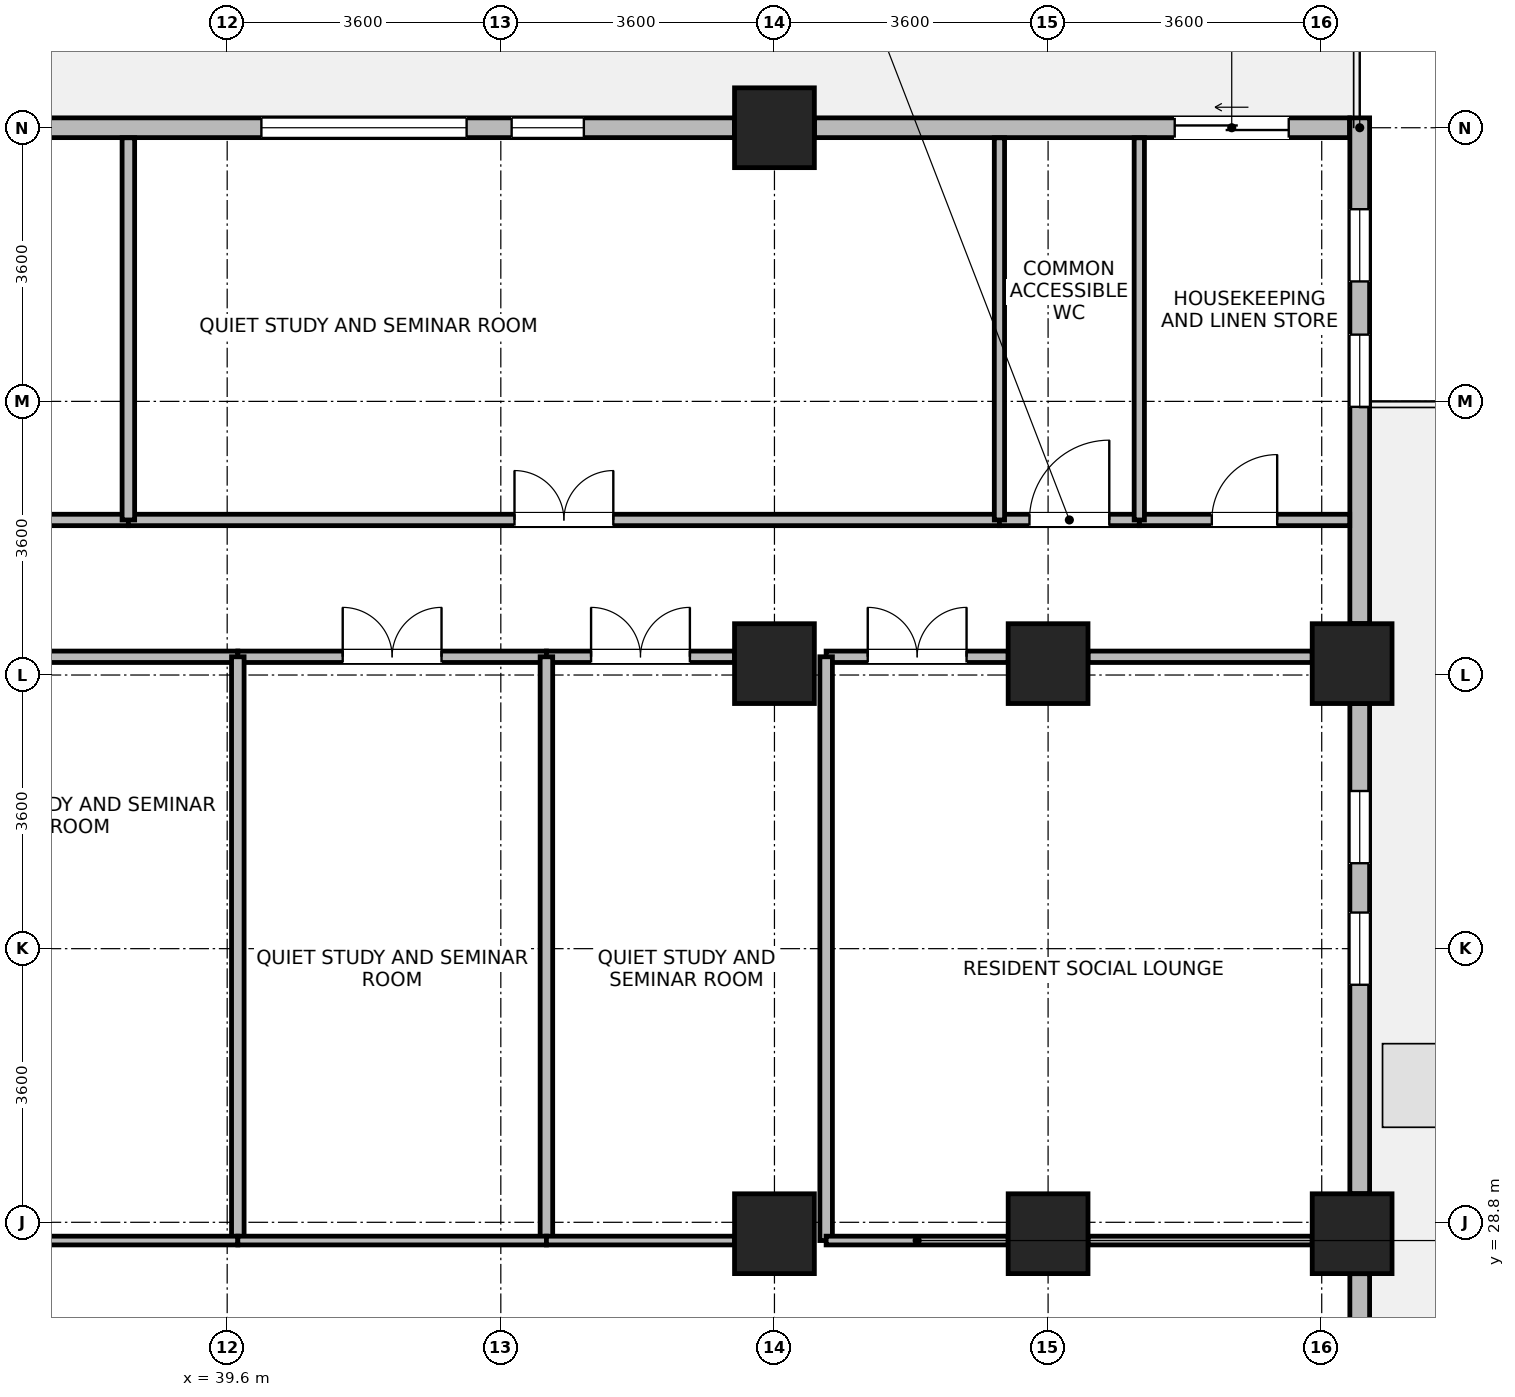
"""IFC4 building model, lengths in metres.
Left out: names, types, materials, properties, quantities, classifications, styles, units other than length and angle.
Written with IfcOpenShell. Run it as: python <this file> out.ifc"""

import sys

from ifc_helpers import new_model, si_unit, direction, frame, frame_2d, origin, origin_2d, place, context, subcontext, project, spatial, rectangle, extrude, source, transform, mapped, element, fill, save


model = new_model("IFC4")
c1 = context("Model", 3, precision=1e-05, world=origin(), true_north=direction((0.0, 1.0)))
c2 = subcontext(c1, "Body", "Model", "MODEL_VIEW")
j1 = project(units=[si_unit("LENGTHUNIT", "METRE"), si_unit("PLANEANGLEUNIT", "RADIAN")], contexts=[c1])
p1 = place(None, origin())
s1 = spatial("IfcSite", under=j1, at=p1, CompositionType="ELEMENT")
p2 = place(p1, origin())
s2 = spatial("IfcBuilding", under=s1, at=p2, CompositionType="ELEMENT")
p3 = place(p2, frame((0.0, 0.0, 135.6)))
s3 = spatial("IfcBuildingStorey", under=s2, at=p3, CompositionType="ELEMENT", Elevation=135.6)
m1 = source(origin(), c2, "Body", "SweptSolid", [
    extrude(rectangle(XDim=1.05, YDim=1.05, at=origin_2d()), origin(), (0.0, 0.0, 1.0), 4.6),
])
for number, where, z_axis, x_axis in (
    (1, (46.8, 28.65, 0.0), (0.0, 0.0, 1.0), (1.0, 0.0, 0.0)),
    (2, (46.8, 36.15, 0.0), (0.0, 0.0, 1.0), (1.0, 0.0, 0.0)),
    (3, (46.8, 43.2, 0.0), (0.0, 0.0, 1.0), (1.0, 0.0, 0.0)),
    (4, (50.4, 28.65, 0.0), (0.0, 0.0, 1.0), (1.0, 0.0, 0.0)),
    (5, (50.4, 36.15, 0.0), (0.0, 0.0, 1.0), (1.0, 0.0, 0.0)),
    (6, (54.4, 28.65, 0.0), (0.0, 0.0, 1.0), (1.0, 0.0, 0.0)),
    (7, (54.4, 36.15, 0.0), (0.0, 0.0, 1.0), (1.0, 0.0, 0.0)),
):
    element("IfcColumn", number, at=place(p3, frame(where, z_axis=z_axis, x_axis=x_axis)), inside=s3, PredefinedType="COLUMN", context=c2, shape_type="MappedRepresentation", body=[
        mapped(m1, transform((0.0, 0.0, 0.0), x_axis=(1.0, 0.0, 0.0), y_axis=(0.0, 1.0, 0.0), z_axis=(0.0, 0.0, 1.0), scale=1.0)),
    ])
p4 = place(p3, frame((54.5, 28.124, 0.0), z_axis=(0.0, 0.0, 1.0), x_axis=(0.0, -1.0, 0.0)))
e8 = element("IfcWall", 8, at=p4, inside=s3, PredefinedType="STANDARD", context=c2, shape_type="SweptSolid", body=[
    extrude(rectangle(XDim=5.998, YDim=0.26, at=frame_2d((2.999, 0.0))), origin(), (0.0, 0.0, 1.0), 3.89),
])
p5 = place(p4, frame((2.099, 0.0, 0.0)))
e9 = element("IfcOpeningElement", 9, at=p5, cuts=e8, PredefinedType="OPENING", context=c2, shape_type="SweptSolid", body=[
    extrude(rectangle(XDim=1.8, YDim=2.2, at=frame_2d((0.9, 1.1))), frame((0.0, 0.14, 0.0), z_axis=(0.0, -1.0, 0.0), x_axis=(1.0, 0.0, 0.0)), (0.0, 0.0, 1.0), 0.28),
])
p6 = place(p3, frame((54.5, 35.624, 0.0), z_axis=(0.0, 0.0, 1.0), x_axis=(0.0, -1.0, 0.0)))
e10 = element("IfcWall", 10, at=p6, inside=s3, PredefinedType="STANDARD", context=c2, shape_type="SweptSolid", body=[
    extrude(rectangle(XDim=6.448, YDim=0.26, at=frame_2d((3.224, 0.0))), origin(), (0.0, 0.0, 1.0), 3.89),
])
p7 = place(p6, frame((2.749, 0.0, 0.85)))
e11 = element("IfcOpeningElement", 11, at=p7, cuts=e10, PredefinedType="OPENING", context=c2, shape_type="SweptSolid", body=[
    extrude(rectangle(XDim=0.95, YDim=1.75, at=frame_2d((0.475, 0.875))), frame((0.0, 0.14, 0.0), z_axis=(0.0, -1.0, 0.0), x_axis=(1.0, 0.0, 0.0)), (0.0, 0.0, 1.0), 0.28),
])
p8 = place(p6, frame((1.15, 0.0, 0.85)))
e12 = element("IfcOpeningElement", 12, at=p8, cuts=e10, PredefinedType="OPENING", context=c2, shape_type="SweptSolid", body=[
    extrude(rectangle(XDim=0.95, YDim=1.75, at=frame_2d((0.475, 0.875))), frame((0.0, 0.14, 0.0), z_axis=(0.0, -1.0, 0.0), x_axis=(1.0, 0.0, 0.0)), (0.0, 0.0, 1.0), 0.28),
])
p9 = place(p3, frame((54.5, 43.33, 0.0), z_axis=(0.0, 0.0, 1.0), x_axis=(0.0, -1.0, 0.0)))
e13 = element("IfcWall", 13, at=p9, inside=s3, PredefinedType="STANDARD", context=c2, shape_type="SweptSolid", body=[
    extrude(rectangle(XDim=6.654, YDim=0.26, at=frame_2d((3.327, 0.0))), origin(), (0.0, 0.0, 1.0), 4.34),
])
p10 = place(p9, frame((2.852, 0.0, 0.85)))
e14 = element("IfcOpeningElement", 14, at=p10, cuts=e13, PredefinedType="OPENING", context=c2, shape_type="SweptSolid", body=[
    extrude(rectangle(XDim=0.95, YDim=1.75, at=frame_2d((0.475, 0.875))), frame((0.0, 0.14, 0.0), z_axis=(0.0, -1.0, 0.0), x_axis=(1.0, 0.0, 0.0)), (0.0, 0.0, 1.0), 0.28),
])
p11 = place(p9, frame((1.202, 0.0, 0.85)))
e15 = element("IfcOpeningElement", 15, at=p11, cuts=e13, PredefinedType="OPENING", context=c2, shape_type="SweptSolid", body=[
    extrude(rectangle(XDim=0.95, YDim=1.75, at=frame_2d((0.475, 0.875))), frame((0.0, 0.14, 0.0), z_axis=(0.0, -1.0, 0.0), x_axis=(1.0, 0.0, 0.0)), (0.0, 0.0, 1.0), 0.28),
])
p12 = place(p3, frame((47.326, 43.2, 0.0), z_axis=(0.0, 0.0, 1.0), x_axis=(1.0, 0.0, 0.0)))
e16 = element("IfcWall", 16, at=p12, inside=s3, PredefinedType="STANDARD", context=c2, shape_type="SweptSolid", body=[
    extrude(rectangle(XDim=7.039, YDim=0.26, at=frame_2d((3.52, 0.0))), origin(), (0.0, 0.0, 1.0), 4.34),
])
p13 = place(p12, frame((4.74, 0.0, 0.0)))
e17 = element("IfcOpeningElement", 17, at=p13, cuts=e16, PredefinedType="OPENING", context=c2, shape_type="SweptSolid", body=[
    extrude(rectangle(XDim=1.5, YDim=2.15, at=frame_2d((0.75, 1.075))), frame((0.0, 0.14, 0.0), z_axis=(0.0, -1.0, 0.0), x_axis=(1.0, 0.0, 0.0)), (0.0, 0.0, 1.0), 0.28),
])
p14 = place(p3, frame((36.526, 43.2, 0.0), z_axis=(0.0, 0.0, 1.0), x_axis=(1.0, 0.0, 0.0)))
e18 = element("IfcWall", 18, at=p14, inside=s3, PredefinedType="STANDARD", context=c2, shape_type="SweptSolid", body=[
    extrude(rectangle(XDim=9.748, YDim=0.26, at=frame_2d((4.874, 0.0))), origin(), (0.0, 0.0, 1.0), 3.89),
])
p15 = place(p14, frame((3.524, 0.0, 0.85)))
e19 = element("IfcOpeningElement", 19, at=p15, cuts=e18, PredefinedType="OPENING", context=c2, shape_type="SweptSolid", body=[
    extrude(rectangle(XDim=2.7, YDim=2.05, at=frame_2d((1.35, 1.025))), frame((0.0, 0.14, 0.0), z_axis=(0.0, -1.0, 0.0), x_axis=(1.0, 0.0, 0.0)), (0.0, 0.0, 1.0), 0.28),
])
p16 = place(p14, frame((6.816, 0.0, 0.85)))
e20 = element("IfcOpeningElement", 20, at=p16, cuts=e18, PredefinedType="OPENING", context=c2, shape_type="SweptSolid", body=[
    extrude(rectangle(XDim=0.95, YDim=1.75, at=frame_2d((0.475, 0.875))), frame((0.0, 0.14, 0.0), z_axis=(0.0, -1.0, 0.0), x_axis=(1.0, 0.0, 0.0)), (0.0, 0.0, 1.0), 0.28),
])
p17 = place(p3, frame((20.28, 38.04, 0.0), z_axis=(0.0, 0.0, 1.0), x_axis=(1.0, 0.0, 0.0)))
e21 = element("IfcWall", 21, at=p17, inside=s3, PredefinedType="PARTITIONING", context=c2, shape_type="SweptSolid", body=[
    extrude(rectangle(XDim=18.02, YDim=0.15, at=frame_2d((9.01, 0.0))), origin(), (0.0, 0.0, 1.0), 4.34),
])
p18 = place(p17, frame((8.56, 0.0, 0.0)))
e22 = element("IfcOpeningElement", 22, at=p18, cuts=e21, PredefinedType="OPENING", context=c2, shape_type="SweptSolid", body=[
    extrude(rectangle(XDim=0.9, YDim=2.08, at=frame_2d((0.45, 1.04))), frame((0.0, 0.085, 0.0), z_axis=(0.0, -1.0, 0.0), x_axis=(1.0, 0.0, 0.0)), (0.0, 0.0, 1.0), 0.17),
])
p19 = place(p3, frame((38.3, 38.04, 0.0), z_axis=(0.0, 0.0, 1.0), x_axis=(1.0, 0.0, 0.0)))
e23 = element("IfcWall", 23, at=p19, inside=s3, PredefinedType="PARTITIONING", context=c2, shape_type="SweptSolid", body=[
    extrude(rectangle(XDim=11.46, YDim=0.15, at=frame_2d((5.73, 0.0))), origin(), (0.0, 0.0, 1.0), 4.34),
])
p20 = place(p19, frame((5.08, 0.0, 0.0)))
e24 = element("IfcOpeningElement", 24, at=p20, cuts=e23, PredefinedType="OPENING", context=c2, shape_type="SweptSolid", body=[
    extrude(rectangle(XDim=1.3, YDim=2.12, at=frame_2d((0.65, 1.06))), frame((0.0, 0.085, 0.0), z_axis=(0.0, -1.0, 0.0), x_axis=(1.0, 0.0, 0.0)), (0.0, 0.0, 1.0), 0.17),
])
p21 = place(p3, frame((47.48, 36.24, 0.0), z_axis=(0.0, 0.0, 1.0), x_axis=(1.0, 0.0, 0.0)))
e25 = element("IfcWall", 25, at=p21, inside=s3, PredefinedType="PARTITIONING", context=c2, shape_type="SweptSolid", body=[
    extrude(rectangle(XDim=2.395, YDim=0.15, at=frame_2d((1.198, 0.0))), origin(), (0.0, 0.0, 1.0), 3.74),
])
p22 = place(p21, frame((0.548, 0.0, 0.0)))
e26 = element("IfcOpeningElement", 26, at=p22, cuts=e25, PredefinedType="OPENING", context=c2, shape_type="SweptSolid", body=[
    extrude(rectangle(XDim=1.3, YDim=2.12, at=frame_2d((0.65, 1.06))), frame((0.0, 0.085, 0.0), z_axis=(0.0, -1.0, 0.0), x_axis=(1.0, 0.0, 0.0)), (0.0, 0.0, 1.0), 0.17),
])
p23 = place(p3, frame((50.925, 36.24, 0.0), z_axis=(0.0, 0.0, 1.0), x_axis=(1.0, 0.0, 0.0)))
e27 = element("IfcWall", 27, at=p23, inside=s3, PredefinedType="PARTITIONING", context=c2, shape_type="SweptSolid", body=[
    extrude(rectangle(XDim=2.95, YDim=0.15, at=frame_2d((1.475, 0.0))), origin(), (0.0, 0.0, 1.0), 3.74),
])
p24 = place(p3, frame((36.525, 36.24, 0.0), z_axis=(0.0, 0.0, 1.0), x_axis=(1.0, 0.0, 0.0)))
e28 = element("IfcWall", 28, at=p24, inside=s3, PredefinedType="PARTITIONING", context=c2, shape_type="SweptSolid", body=[
    extrude(rectangle(XDim=3.215, YDim=0.15, at=frame_2d((1.607, 0.0))), origin(), (0.0, 0.0, 1.0), 3.74),
])
p25 = place(p3, frame((39.74, 36.24, 0.0), z_axis=(0.0, 0.0, 1.0), x_axis=(1.0, 0.0, 0.0)))
e29 = element("IfcWall", 29, at=p25, inside=s3, PredefinedType="PARTITIONING", context=c2, shape_type="SweptSolid", body=[
    extrude(rectangle(XDim=4.06, YDim=0.15, at=frame_2d((2.03, 0.0))), origin(), (0.0, 0.0, 1.0), 3.74),
])
p26 = place(p25, frame((1.38, 0.0, 0.0)))
e30 = element("IfcOpeningElement", 30, at=p26, cuts=e29, PredefinedType="OPENING", context=c2, shape_type="SweptSolid", body=[
    extrude(rectangle(XDim=1.3, YDim=2.12, at=frame_2d((0.65, 1.06))), frame((0.0, 0.085, 0.0), z_axis=(0.0, -1.0, 0.0), x_axis=(1.0, 0.0, 0.0)), (0.0, 0.0, 1.0), 0.17),
])
p27 = place(p3, frame((43.8, 36.24, 0.0), z_axis=(0.0, 0.0, 1.0), x_axis=(1.0, 0.0, 0.0)))
e31 = element("IfcWall", 31, at=p27, inside=s3, PredefinedType="PARTITIONING", context=c2, shape_type="SweptSolid", body=[
    extrude(rectangle(XDim=2.475, YDim=0.15, at=frame_2d((1.237, 0.0))), origin(), (0.0, 0.0, 1.0), 3.74),
])
p28 = place(p27, frame((0.587, 0.0, 0.0)))
e32 = element("IfcOpeningElement", 32, at=p28, cuts=e31, PredefinedType="OPENING", context=c2, shape_type="SweptSolid", body=[
    extrude(rectangle(XDim=1.3, YDim=2.12, at=frame_2d((0.65, 1.06))), frame((0.0, 0.085, 0.0), z_axis=(0.0, -1.0, 0.0), x_axis=(1.0, 0.0, 0.0)), (0.0, 0.0, 1.0), 0.17),
])
p29 = place(p3, frame((51.6, 38.04, 0.0), z_axis=(0.0, 0.0, 1.0), x_axis=(1.0, 0.0, 0.0)))
e33 = element("IfcWall", 33, at=p29, inside=s3, PredefinedType="PARTITIONING", context=c2, shape_type="SweptSolid", body=[
    extrude(rectangle(XDim=2.768, YDim=0.15, at=frame_2d((1.384, 0.0))), origin(), (0.0, 0.0, 1.0), 4.34),
])
p30 = place(p29, frame((0.954, 0.0, 0.0)))
e34 = element("IfcOpeningElement", 34, at=p30, cuts=e33, PredefinedType="OPENING", context=c2, shape_type="SweptSolid", body=[
    extrude(rectangle(XDim=0.86, YDim=2.02, at=frame_2d((0.43, 1.01))), frame((0.0, 0.085, 0.0), z_axis=(0.0, -1.0, 0.0), x_axis=(1.0, 0.0, 0.0)), (0.0, 0.0, 1.0), 0.17),
])
p31 = place(p3, frame((49.76, 38.04, 0.0), z_axis=(0.0, 0.0, 1.0), x_axis=(1.0, 0.0, 0.0)))
e35 = element("IfcWall", 35, at=p31, inside=s3, PredefinedType="PARTITIONING", context=c2, shape_type="SweptSolid", body=[
    extrude(rectangle(XDim=1.84, YDim=0.15, at=frame_2d((0.92, 0.0))), origin(), (0.0, 0.0, 1.0), 4.34),
])
p32 = place(p31, frame((0.395, 0.0, 0.0)))
e36 = element("IfcOpeningElement", 36, at=p32, cuts=e35, PredefinedType="OPENING", context=c2, shape_type="SweptSolid", body=[
    extrude(rectangle(XDim=1.05, YDim=2.12, at=frame_2d((0.525, 1.06))), frame((0.0, 0.085, 0.0), z_axis=(0.0, -1.0, 0.0), x_axis=(1.0, 0.0, 0.0)), (0.0, 0.0, 1.0), 0.17),
])
for number, where, z_axis, x_axis in (
    (37, (39.74, 28.56, 0.0), (0.0, 0.0, 1.0), (0.0, 1.0, 0.0)),
    (38, (43.8, 28.56, 0.0), (0.0, 0.0, 1.0), (0.0, 1.0, 0.0)),
    (39, (47.48, 28.56, 0.0), (0.0, 0.0, 1.0), (0.0, 1.0, 0.0)),
):
    element("IfcWall", number, at=place(p3, frame(where, z_axis=z_axis, x_axis=x_axis)), inside=s3, PredefinedType="PARTITIONING", context=c2, shape_type="SweptSolid", body=[
        extrude(rectangle(XDim=7.68, YDim=0.165, at=frame_2d((3.84, 0.0))), origin(), (0.0, 0.0, 1.0), 4.34),
    ])
p33 = place(p3, frame((47.48, 28.56, 0.0), z_axis=(0.0, 0.0, 1.0), x_axis=(1.0, 0.0, 0.0)))
e40 = element("IfcWall", 40, at=p33, inside=s3, PredefinedType="PARTITIONING", context=c2, shape_type="SweptSolid", body=[
    extrude(rectangle(XDim=2.395, YDim=0.115, at=frame_2d((1.198, 0.0))), origin(), (0.0, 0.0, 1.0), 3.74),
])
p34 = place(p3, frame((50.925, 28.56, 0.0), z_axis=(0.0, 0.0, 1.0), x_axis=(1.0, 0.0, 0.0)))
e41 = element("IfcWall", 41, at=p34, inside=s3, PredefinedType="PARTITIONING", context=c2, shape_type="SweptSolid", body=[
    extrude(rectangle(XDim=2.95, YDim=0.115, at=frame_2d((1.475, 0.0))), origin(), (0.0, 0.0, 1.0), 3.74),
])
p35 = place(p3, frame((38.3, 38.04, 0.0), z_axis=(0.0, 0.0, 1.0), x_axis=(0.0, 1.0, 0.0)))
e42 = element("IfcWall", 42, at=p35, inside=s3, PredefinedType="PARTITIONING", context=c2, shape_type="SweptSolid", body=[
    extrude(rectangle(XDim=5.028, YDim=0.165, at=frame_2d((2.514, 0.0))), origin(), (0.0, 0.0, 1.0), 4.34),
])
for number, where, z_axis, x_axis in (
    (43, (49.76, 38.04, 0.0), (0.0, 0.0, 1.0), (0.0, 1.0, 0.0)),
    (44, (51.6, 38.04, 0.0), (0.0, 0.0, 1.0), (0.0, 1.0, 0.0)),
):
    element("IfcWall", number, at=place(p3, frame(where, z_axis=z_axis, x_axis=x_axis)), inside=s3, PredefinedType="PARTITIONING", context=c2, shape_type="SweptSolid", body=[
        extrude(rectangle(XDim=5.028, YDim=0.135, at=frame_2d((2.514, 0.0))), origin(), (0.0, 0.0, 1.0), 4.34),
    ])
p36 = place(p3, frame((36.525, 28.56, 0.0), z_axis=(0.0, 0.0, 1.0), x_axis=(1.0, 0.0, 0.0)))
e45 = element("IfcWall", 45, at=p36, inside=s3, PredefinedType="PARTITIONING", context=c2, shape_type="SweptSolid", body=[
    extrude(rectangle(XDim=3.215, YDim=0.115, at=frame_2d((1.607, 0.0))), origin(), (0.0, 0.0, 1.0), 3.74),
])
p37 = place(p3, frame((39.74, 28.56, 0.0), z_axis=(0.0, 0.0, 1.0), x_axis=(1.0, 0.0, 0.0)))
e46 = element("IfcWall", 46, at=p37, inside=s3, PredefinedType="PARTITIONING", context=c2, shape_type="SweptSolid", body=[
    extrude(rectangle(XDim=4.06, YDim=0.115, at=frame_2d((2.03, 0.0))), origin(), (0.0, 0.0, 1.0), 3.74),
])
p38 = place(p3, frame((43.8, 28.56, 0.0), z_axis=(0.0, 0.0, 1.0), x_axis=(1.0, 0.0, 0.0)))
e47 = element("IfcWall", 47, at=p38, inside=s3, PredefinedType="PARTITIONING", context=c2, shape_type="SweptSolid", body=[
    extrude(rectangle(XDim=2.475, YDim=0.115, at=frame_2d((1.237, 0.0))), origin(), (0.0, 0.0, 1.0), 3.74),
])
p39 = place(p7, origin())
e48 = element("IfcWindow", 48, at=p39, inside=s3, PartitioningType="SINGLE_PANEL", PredefinedType="WINDOW", context=c2, shape_type="SweptSolid", body=[
    extrude(rectangle(XDim=0.95, YDim=1.75, at=frame_2d((0.475, 0.875))), frame((0.0, 0.03, 0.0), z_axis=(0.0, -1.0, 0.0), x_axis=(1.0, 0.0, 0.0)), (0.0, 0.0, 1.0), 0.06),
])
fill(e11, e48)
p40 = place(p8, origin())
e49 = element("IfcWindow", 49, at=p40, inside=s3, PartitioningType="SINGLE_PANEL", PredefinedType="WINDOW", context=c2, shape_type="SweptSolid", body=[
    extrude(rectangle(XDim=0.95, YDim=1.75, at=frame_2d((0.475, 0.875))), frame((0.0, 0.03, 0.0), z_axis=(0.0, -1.0, 0.0), x_axis=(1.0, 0.0, 0.0)), (0.0, 0.0, 1.0), 0.06),
])
fill(e12, e49)
p41 = place(p10, origin())
e50 = element("IfcWindow", 50, at=p41, inside=s3, PartitioningType="SINGLE_PANEL", PredefinedType="WINDOW", context=c2, shape_type="SweptSolid", body=[
    extrude(rectangle(XDim=0.95, YDim=1.75, at=frame_2d((0.475, 0.875))), frame((0.0, 0.03, 0.0), z_axis=(0.0, -1.0, 0.0), x_axis=(1.0, 0.0, 0.0)), (0.0, 0.0, 1.0), 0.06),
])
fill(e14, e50)
p42 = place(p11, origin())
e51 = element("IfcWindow", 51, at=p42, inside=s3, PartitioningType="SINGLE_PANEL", PredefinedType="WINDOW", context=c2, shape_type="SweptSolid", body=[
    extrude(rectangle(XDim=0.95, YDim=1.75, at=frame_2d((0.475, 0.875))), frame((0.0, 0.03, 0.0), z_axis=(0.0, -1.0, 0.0), x_axis=(1.0, 0.0, 0.0)), (0.0, 0.0, 1.0), 0.06),
])
fill(e15, e51)
p43 = place(p13, origin())
e52 = element("IfcDoor", 52, at=p43, inside=s3, OperationType="SLIDING_TO_LEFT", PredefinedType="DOOR", context=c2, shape_type="SweptSolid", body=[
    extrude(rectangle(XDim=1.5, YDim=2.15, at=frame_2d((0.75, 1.075))), frame((0.0, 0.025, 0.0), z_axis=(0.0, -1.0, 0.0), x_axis=(1.0, 0.0, 0.0)), (0.0, 0.0, 1.0), 0.05),
])
fill(e17, e52)
p44 = place(p15, origin())
e53 = element("IfcWindow", 53, at=p44, inside=s3, PartitioningType="SINGLE_PANEL", PredefinedType="WINDOW", context=c2, shape_type="SweptSolid", body=[
    extrude(rectangle(XDim=2.7, YDim=2.05, at=frame_2d((1.35, 1.025))), frame((0.0, 0.03, 0.0), z_axis=(0.0, -1.0, 0.0), x_axis=(1.0, 0.0, 0.0)), (0.0, 0.0, 1.0), 0.06),
])
fill(e19, e53)
p45 = place(p16, origin())
e54 = element("IfcWindow", 54, at=p45, inside=s3, PartitioningType="SINGLE_PANEL", PredefinedType="WINDOW", context=c2, shape_type="SweptSolid", body=[
    extrude(rectangle(XDim=0.95, YDim=1.75, at=frame_2d((0.475, 0.875))), frame((0.0, 0.03, 0.0), z_axis=(0.0, -1.0, 0.0), x_axis=(1.0, 0.0, 0.0)), (0.0, 0.0, 1.0), 0.06),
])
fill(e20, e54)
p46 = place(p20, origin())
e55 = element("IfcDoor", 55, at=p46, inside=s3, OperationType="DOUBLE_DOOR_SINGLE_SWING", PredefinedType="DOOR", context=c2, shape_type="SweptSolid", body=[
    extrude(rectangle(XDim=1.3, YDim=2.12, at=frame_2d((0.65, 1.06))), frame((0.0, 0.025, 0.0), z_axis=(0.0, -1.0, 0.0), x_axis=(1.0, 0.0, 0.0)), (0.0, 0.0, 1.0), 0.05),
])
fill(e24, e55)
p47 = place(p22, origin())
e56 = element("IfcDoor", 56, at=p47, inside=s3, OperationType="DOUBLE_DOOR_SINGLE_SWING", PredefinedType="DOOR", context=c2, shape_type="SweptSolid", body=[
    extrude(rectangle(XDim=1.3, YDim=2.12, at=frame_2d((0.65, 1.06))), frame((0.0, 0.025, 0.0), z_axis=(0.0, -1.0, 0.0), x_axis=(1.0, 0.0, 0.0)), (0.0, 0.0, 1.0), 0.05),
])
fill(e26, e56)
p48 = place(p26, origin())
e57 = element("IfcDoor", 57, at=p48, inside=s3, OperationType="DOUBLE_DOOR_SINGLE_SWING", PredefinedType="DOOR", context=c2, shape_type="SweptSolid", body=[
    extrude(rectangle(XDim=1.3, YDim=2.12, at=frame_2d((0.65, 1.06))), frame((0.0, 0.025, 0.0), z_axis=(0.0, -1.0, 0.0), x_axis=(1.0, 0.0, 0.0)), (0.0, 0.0, 1.0), 0.05),
])
fill(e30, e57)
p49 = place(p28, origin())
e58 = element("IfcDoor", 58, at=p49, inside=s3, OperationType="DOUBLE_DOOR_SINGLE_SWING", PredefinedType="DOOR", context=c2, shape_type="SweptSolid", body=[
    extrude(rectangle(XDim=1.3, YDim=2.12, at=frame_2d((0.65, 1.06))), frame((0.0, 0.025, 0.0), z_axis=(0.0, -1.0, 0.0), x_axis=(1.0, 0.0, 0.0)), (0.0, 0.0, 1.0), 0.05),
])
fill(e32, e58)
p50 = place(p30, origin())
e59 = element("IfcDoor", 59, at=p50, inside=s3, OperationType="SINGLE_SWING_RIGHT", PredefinedType="DOOR", context=c2, shape_type="SweptSolid", body=[
    extrude(rectangle(XDim=0.86, YDim=2.02, at=frame_2d((0.43, 1.01))), frame((0.0, 0.025, 0.0), z_axis=(0.0, -1.0, 0.0), x_axis=(1.0, 0.0, 0.0)), (0.0, 0.0, 1.0), 0.05),
])
fill(e34, e59)
p51 = place(p32, origin())
e60 = element("IfcDoor", 60, at=p51, inside=s3, OperationType="SINGLE_SWING_RIGHT", PredefinedType="DOOR", context=c2, shape_type="SweptSolid", body=[
    extrude(rectangle(XDim=1.05, YDim=2.12, at=frame_2d((0.525, 1.06))), frame((0.0, 0.025, 0.0), z_axis=(0.0, -1.0, 0.0), x_axis=(1.0, 0.0, 0.0)), (0.0, 0.0, 1.0), 0.05),
])
fill(e36, e60)
save(model, sys.argv[1])
